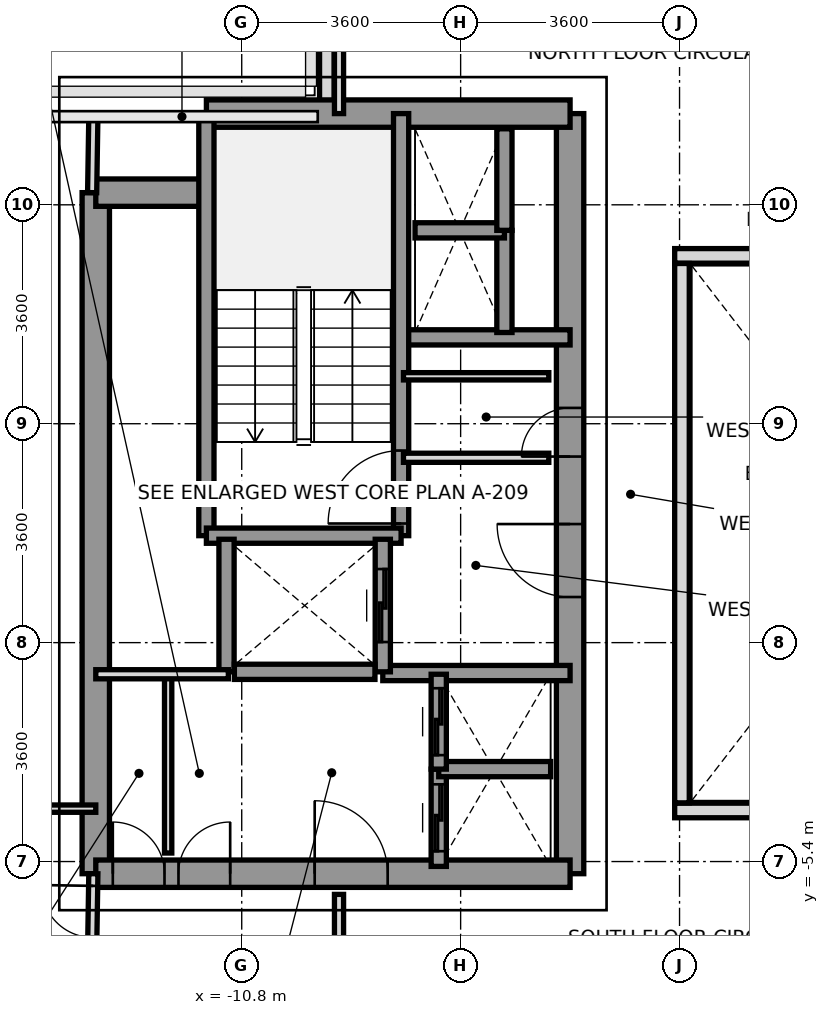
"""IFC4 building model, lengths in metres.
Left out: names, types, materials, properties, quantities, classifications, styles, units other than length and angle.
Written with IfcOpenShell. Run it as: python <this file> out.ifc"""

import sys

from ifc_helpers import new_model, si_unit, direction, frame, frame_2d, origin, place, context, subcontext, project, spatial, rectangle, extrude, source, transform, mapped, element, fill, save


model = new_model("IFC4")
c1 = context("Model", 3, precision=1e-05, world=origin(), true_north=direction((0.0, 1.0)))
c2 = subcontext(c1, "Body", "Model", "MODEL_VIEW")
j1 = project(units=[si_unit("LENGTHUNIT", "METRE"), si_unit("PLANEANGLEUNIT", "RADIAN")], contexts=[c1])
p1 = place(None, origin())
s1 = spatial("IfcSite", under=j1, at=p1, CompositionType="ELEMENT")
p2 = place(p1, origin())
s2 = spatial("IfcBuilding", under=s1, at=p2, CompositionType="ELEMENT")
p3 = place(p2, frame((0.0, 0.0, 124.4)))
s3 = spatial("IfcBuildingStorey", under=s2, at=p3, CompositionType="ELEMENT", Elevation=124.4)
p4 = place(p3, frame((-9.4, 6.953, 0.0), z_axis=(0.0, 0.0, 1.0), x_axis=(0.0, 1.0, 0.0)))
e1 = element("IfcWall", 1, at=p4, inside=s3, PredefinedType="PARAPET", context=c2, shape_type="SweptSolid", body=[
    extrude(rectangle(XDim=1.519, YDim=0.24, at=frame_2d((0.76, 0.0))), origin(), (0.0, 0.0, 1.0), 1.15),
])
p5 = place(p3, frame((-13.2, -5.6, 0.0), z_axis=(0.0, 0.0, 1.0), x_axis=(0.0, 1.0, 0.0)))
e2 = element("IfcWall", 2, at=p5, inside=s3, PredefinedType="SHEAR", context=c2, shape_type="SweptSolid", body=[
    extrude(rectangle(XDim=11.2, YDim=0.45, at=frame_2d((5.6, 0.0))), origin(), (0.0, 0.0, 1.0), 3.2),
])
p6 = place(p3, frame((-5.4, -5.6, 0.0), z_axis=(0.0, 0.0, 1.0), x_axis=(0.0, 1.0, 0.0)))
e3 = element("IfcWall", 3, at=p6, inside=s3, PredefinedType="SHEAR", context=c2, shape_type="SweptSolid", body=[
    extrude(rectangle(XDim=12.5, YDim=0.45, at=frame_2d((6.25, 0.0))), origin(), (0.0, 0.0, 1.0), 3.2),
])
p7 = place(p6, frame((4.55, 0.0, 0.0)))
e4 = element("IfcOpeningElement", 4, at=p7, cuts=e3, PredefinedType="OPENING", context=c2, shape_type="SweptSolid", body=[
    extrude(rectangle(XDim=1.2, YDim=2.2, at=frame_2d((0.6, 1.1))), frame((0.0, 0.235, 0.0), z_axis=(0.0, -1.0, 0.0), x_axis=(1.0, 0.0, 0.0)), (0.0, 0.0, 1.0), 0.47),
])
p8 = place(p6, frame((6.86, 0.0, 0.0)))
e5 = element("IfcOpeningElement", 5, at=p8, cuts=e3, PredefinedType="OPENING", context=c2, shape_type="SweptSolid", body=[
    extrude(rectangle(XDim=0.8, YDim=2.1, at=frame_2d((0.4, 1.05))), frame((0.0, 0.235, 0.0), z_axis=(0.0, -1.0, 0.0), x_axis=(1.0, 0.0, 0.0)), (0.0, 0.0, 1.0), 0.47),
])
p9 = place(p3, frame((-11.381, 6.9, 0.0), z_axis=(0.0, 0.0, 1.0), x_axis=(1.0, 0.0, 0.0)))
e6 = element("IfcWall", 6, at=p9, inside=s3, PredefinedType="SHEAR", context=c2, shape_type="SweptSolid", body=[
    extrude(rectangle(XDim=5.981, YDim=0.45, at=frame_2d((2.991, 0.0))), origin(), (0.0, 0.0, 1.0), 3.2),
])
p10 = place(p3, frame((-13.2, 5.6, 0.0), z_axis=(0.0, 0.0, 1.0), x_axis=(1.0, 0.0, 0.0)))
e7 = element("IfcWall", 7, at=p10, inside=s3, PredefinedType="SHEAR", context=c2, shape_type="SweptSolid", body=[
    extrude(rectangle(XDim=1.819, YDim=0.45, at=frame_2d((0.909, 0.0))), origin(), (0.0, 0.0, 1.0), 3.2),
])
p11 = place(p3, frame((-13.2, -5.6, 0.0), z_axis=(0.0, 0.0, 1.0), x_axis=(1.0, 0.0, 0.0)))
e8 = element("IfcWall", 8, at=p11, inside=s3, PredefinedType="SHEAR", context=c2, shape_type="SweptSolid", body=[
    extrude(rectangle(XDim=7.8, YDim=0.45, at=frame_2d((3.9, 0.0))), origin(), (0.0, 0.0, 1.0), 3.2),
])
p12 = place(p11, frame((3.6, 0.0, 0.0)))
e9 = element("IfcOpeningElement", 9, at=p12, cuts=e8, PredefinedType="OPENING", context=c2, shape_type="SweptSolid", body=[
    extrude(rectangle(XDim=1.2, YDim=2.2, at=frame_2d((0.6, 1.1))), frame((0.0, 0.235, 0.0), z_axis=(0.0, -1.0, 0.0), x_axis=(1.0, 0.0, 0.0)), (0.0, 0.0, 1.0), 0.47),
])
p13 = place(p11, frame((0.28, 0.0, 0.0)))
e10 = element("IfcOpeningElement", 10, at=p13, cuts=e8, PredefinedType="OPENING", context=c2, shape_type="SweptSolid", body=[
    extrude(rectangle(XDim=0.85, YDim=2.1, at=frame_2d((0.425, 1.05))), frame((0.0, 0.235, 0.0), z_axis=(0.0, -1.0, 0.0), x_axis=(1.0, 0.0, 0.0)), (0.0, 0.0, 1.0), 0.47),
])
p14 = place(p11, frame((1.36, 0.0, 0.0)))
e11 = element("IfcOpeningElement", 11, at=p14, cuts=e8, PredefinedType="OPENING", context=c2, shape_type="SweptSolid", body=[
    extrude(rectangle(XDim=0.85, YDim=2.1, at=frame_2d((0.425, 1.05))), frame((0.0, 0.235, 0.0), z_axis=(0.0, -1.0, 0.0), x_axis=(1.0, 0.0, 0.0)), (0.0, 0.0, 1.0), 0.47),
])
p15 = place(p3, frame((-8.18, 3.22, 0.0), z_axis=(0.0, 0.0, 1.0), x_axis=(1.0, 0.0, 0.0)))
e12 = element("IfcWall", 12, at=p15, inside=s3, PredefinedType="SOLIDWALL", context=c2, shape_type="SweptSolid", body=[
    extrude(rectangle(XDim=2.78, YDim=0.25, at=frame_2d((1.39, 0.0))), origin(), (0.0, 0.0, 1.0), 3.2),
])
p16 = place(p3, frame((-8.48, -2.3, 0.0), z_axis=(0.0, 0.0, 1.0), x_axis=(1.0, 0.0, 0.0)))
e13 = element("IfcWall", 13, at=p16, inside=s3, PredefinedType="SOLIDWALL", context=c2, shape_type="SweptSolid", body=[
    extrude(rectangle(XDim=3.08, YDim=0.25, at=frame_2d((1.54, 0.0))), origin(), (0.0, 0.0, 1.0), 3.2),
])
p17 = place(p3, frame((-8.179, -0.041, 0.0), z_axis=(0.0, 0.0, 1.0), x_axis=(0.0, 1.0, 0.0)))
e14 = element("IfcWall", 14, at=p17, inside=s3, PredefinedType="SOLIDWALL", context=c2, shape_type="SweptSolid", body=[
    extrude(rectangle(XDim=6.941, YDim=0.25, at=frame_2d((3.47, 0.0))), origin(), (0.0, 0.0, 1.0), 3.2),
])
p18 = place(p17, frame((0.2, 0.0, 0.0)))
e15 = element("IfcOpeningElement", 15, at=p18, cuts=e14, PredefinedType="OPENING", context=c2, shape_type="SweptSolid", body=[
    extrude(rectangle(XDim=1.2, YDim=2.2, at=frame_2d((0.6, 1.1))), frame((0.0, 0.135, 0.0), z_axis=(0.0, -1.0, 0.0), x_axis=(1.0, 0.0, 0.0)), (0.0, 0.0, 1.0), 0.27),
])
p19 = place(p3, frame((-11.381, -0.041, 0.0), z_axis=(0.0, 0.0, 1.0), x_axis=(0.0, 1.0, 0.0)))
e16 = element("IfcWall", 16, at=p19, inside=s3, PredefinedType="SOLIDWALL", context=c2, shape_type="SweptSolid", body=[
    extrude(rectangle(XDim=6.941, YDim=0.25, at=frame_2d((3.47, 0.0))), origin(), (0.0, 0.0, 1.0), 3.2),
])
p20 = place(p3, frame((-11.381, -0.041, 0.0), z_axis=(0.0, 0.0, 1.0), x_axis=(1.0, 0.0, 0.0)))
e17 = element("IfcWall", 17, at=p20, inside=s3, PredefinedType="SOLIDWALL", context=c2, shape_type="SweptSolid", body=[
    extrude(rectangle(XDim=3.202, YDim=0.25, at=frame_2d((1.601, 0.0))), origin(), (0.0, 0.0, 1.0), 3.2),
])
p21 = place(p3, frame((-11.05, -2.28, 0.0), z_axis=(0.0, 0.0, 1.0), x_axis=(0.0, 1.0, 0.0)))
e18 = element("IfcWall", 18, at=p21, inside=s3, PredefinedType="SOLIDWALL", context=c2, shape_type="SweptSolid", body=[
    extrude(rectangle(XDim=2.18, YDim=0.25, at=frame_2d((1.09, 0.0))), origin(), (0.0, 0.0, 1.0), 3.2),
])
p22 = place(p3, frame((-8.48, -2.28, 0.0), z_axis=(0.0, 0.0, 1.0), x_axis=(0.0, 1.0, 0.0)))
e19 = element("IfcWall", 19, at=p22, inside=s3, PredefinedType="SOLIDWALL", context=c2, shape_type="SweptSolid", body=[
    extrude(rectangle(XDim=2.18, YDim=0.25, at=frame_2d((1.09, 0.0))), origin(), (0.0, 0.0, 1.0), 3.2),
])
p23 = place(p22, frame((0.49, 0.0, 0.0)))
e20 = element("IfcOpeningElement", 20, at=p23, cuts=e19, PredefinedType="OPENING", context=c2, shape_type="SweptSolid", body=[
    extrude(rectangle(XDim=1.2, YDim=2.2, at=frame_2d((0.6, 1.1))), frame((0.0, 0.135, 0.0), z_axis=(0.0, -1.0, 0.0), x_axis=(1.0, 0.0, 0.0)), (0.0, 0.0, 1.0), 0.27),
])
p24 = place(p3, frame((-10.921, -2.28, 0.0), z_axis=(0.0, 0.0, 1.0), x_axis=(1.0, 0.0, 0.0)))
e21 = element("IfcWall", 21, at=p24, inside=s3, PredefinedType="SOLIDWALL", context=c2, shape_type="SweptSolid", body=[
    extrude(rectangle(XDim=2.312, YDim=0.25, at=frame_2d((1.156, 0.0))), origin(), (0.0, 0.0, 1.0), 3.2),
])
p25 = place(p3, frame((-7.56, -5.48, 0.0), z_axis=(0.0, 0.0, 1.0), x_axis=(0.0, 1.0, 0.0)))
e22 = element("IfcWall", 22, at=p25, inside=s3, PredefinedType="SOLIDWALL", context=c2, shape_type="SweptSolid", body=[
    extrude(rectangle(XDim=1.6, YDim=0.25, at=frame_2d((0.8, 0.0))), origin(), (0.0, 0.0, 1.0), 3.2),
])
p26 = place(p25, frame((0.25, 0.0, 0.0)))
e23 = element("IfcOpeningElement", 23, at=p26, cuts=e22, PredefinedType="OPENING", context=c2, shape_type="SweptSolid", body=[
    extrude(rectangle(XDim=1.1, YDim=2.2, at=frame_2d((0.55, 1.1))), frame((0.0, 0.135, 0.0), z_axis=(0.0, -1.0, 0.0), x_axis=(1.0, 0.0, 0.0)), (0.0, 0.0, 1.0), 0.27),
])
p27 = place(p3, frame((-7.56, -3.88, 0.0), z_axis=(0.0, 0.0, 1.0), x_axis=(1.0, 0.0, 0.0)))
e24 = element("IfcWall", 24, at=p27, inside=s3, PredefinedType="SOLIDWALL", context=c2, shape_type="SweptSolid", body=[
    extrude(rectangle(XDim=1.84, YDim=0.25, at=frame_2d((0.92, 0.0))), origin(), (0.0, 0.0, 1.0), 3.2),
])
p28 = place(p3, frame((-7.56, -3.88, 0.0), z_axis=(0.0, 0.0, 1.0), x_axis=(0.0, 1.0, 0.0)))
e25 = element("IfcWall", 25, at=p28, inside=s3, PredefinedType="SOLIDWALL", context=c2, shape_type="SweptSolid", body=[
    extrude(rectangle(XDim=1.56, YDim=0.25, at=frame_2d((0.78, 0.0))), origin(), (0.0, 0.0, 1.0), 3.2),
])
p29 = place(p28, frame((0.23, 0.0, 0.0)))
e26 = element("IfcOpeningElement", 26, at=p29, cuts=e25, PredefinedType="OPENING", context=c2, shape_type="SweptSolid", body=[
    extrude(rectangle(XDim=1.1, YDim=2.2, at=frame_2d((0.55, 1.1))), frame((0.0, 0.135, 0.0), z_axis=(0.0, -1.0, 0.0), x_axis=(1.0, 0.0, 0.0)), (0.0, 0.0, 1.0), 0.27),
])
p30 = place(p3, frame((-6.48, 3.3, 0.0), z_axis=(0.0, 0.0, 1.0), x_axis=(0.0, 1.0, 0.0)))
e27 = element("IfcWall", 27, at=p30, inside=s3, PredefinedType="SOLIDWALL", context=c2, shape_type="SweptSolid", body=[
    extrude(rectangle(XDim=1.68, YDim=0.25, at=frame_2d((0.84, 0.0))), origin(), (0.0, 0.0, 1.0), 3.2),
])
p31 = place(p3, frame((-7.95, 4.98, 0.0), z_axis=(0.0, 0.0, 1.0), x_axis=(1.0, 0.0, 0.0)))
e28 = element("IfcWall", 28, at=p31, inside=s3, PredefinedType="SOLIDWALL", context=c2, shape_type="SweptSolid", body=[
    extrude(rectangle(XDim=1.47, YDim=0.25, at=frame_2d((0.735, 0.0))), origin(), (0.0, 0.0, 1.0), 3.2),
])
p32 = place(p3, frame((-6.48, 4.98, 0.0), z_axis=(0.0, 0.0, 1.0), x_axis=(0.0, 1.0, 0.0)))
e29 = element("IfcWall", 29, at=p32, inside=s3, PredefinedType="SOLIDWALL", context=c2, shape_type="SweptSolid", body=[
    extrude(rectangle(XDim=1.67, YDim=0.25, at=frame_2d((0.835, 0.0))), origin(), (0.0, 0.0, 1.0), 3.2),
])
p33 = place(p3, frame((-8.14, 1.24, 0.0), z_axis=(0.0, 0.0, 1.0), x_axis=(1.0, 0.0, 0.0)))
e30 = element("IfcWall", 30, at=p33, inside=s3, PredefinedType="PARTITIONING", context=c2, shape_type="SweptSolid", body=[
    extrude(rectangle(XDim=2.39, YDim=0.15, at=frame_2d((1.195, 0.0))), origin(), (0.0, 0.0, 1.0), 2.3),
])
p34 = place(p3, frame((-8.14, 2.58, 0.0), z_axis=(0.0, 0.0, 1.0), x_axis=(1.0, 0.0, 0.0)))
e31 = element("IfcWall", 31, at=p34, inside=s3, PredefinedType="PARTITIONING", context=c2, shape_type="SweptSolid", body=[
    extrude(rectangle(XDim=2.39, YDim=0.12, at=frame_2d((1.195, 0.0))), origin(), (0.0, 0.0, 1.0), 2.3),
])
p35 = place(p3, frame((-12.01, -5.26, 0.0), z_axis=(0.0, 0.0, 1.0), x_axis=(0.0, 1.0, 0.0)))
e32 = element("IfcWall", 32, at=p35, inside=s3, PredefinedType="PARTITIONING", context=c2, shape_type="SweptSolid", body=[
    extrude(rectangle(XDim=2.94, YDim=0.12, at=frame_2d((1.47, 0.0))), origin(), (0.0, 0.0, 1.0), 3.2),
])
p36 = place(p3, frame((-13.2, -2.32, 0.0), z_axis=(0.0, 0.0, 1.0), x_axis=(1.0, 0.0, 0.0)))
e33 = element("IfcWall", 33, at=p36, inside=s3, PredefinedType="PARTITIONING", context=c2, shape_type="SweptSolid", body=[
    extrude(rectangle(XDim=2.18, YDim=0.15, at=frame_2d((1.09, 0.0))), origin(), (0.0, 0.0, 1.0), 3.2),
])
p37 = place(p3, frame((-9.2, 6.9, 0.0), z_axis=(0.0, 0.0, 1.0), x_axis=(0.0, 1.0, 0.0)))
e34 = element("IfcWall", 34, at=p37, inside=s3, PredefinedType="PARTITIONING", context=c2, shape_type="SweptSolid", body=[
    extrude(rectangle(XDim=8.78, YDim=0.15, at=frame_2d((4.39, 0.0))), origin(), (0.0, 0.0, 1.0), 2.7),
])
p38 = place(p3, frame((-9.2, -15.68, 0.0), z_axis=(0.0, 0.0, 1.0), x_axis=(0.0, 1.0, 0.0)))
e35 = element("IfcWall", 35, at=p38, inside=s3, PredefinedType="PARTITIONING", context=c2, shape_type="SweptSolid", body=[
    extrude(rectangle(XDim=9.74, YDim=0.15, at=frame_2d((4.87, 0.0))), origin(), (0.0, 0.0, 1.0), 2.7),
])
p39 = place(p3, frame((-13.26, 5.6, 0.0), z_axis=(0.0, 0.0, 1.0), x_axis=(0.016013571389, 0.999871774545, 0.0)))
e36 = element("IfcWall", 36, at=p39, inside=s3, PredefinedType="PARTITIONING", context=c2, shape_type="SweptSolid", body=[
    extrude(rectangle(XDim=1.25, YDim=0.15, at=frame_2d((0.625, 0.0))), origin(), (0.0, 0.0, 1.0), 3.2),
])
p40 = place(p3, frame((-13.26, -6.85, 0.0), z_axis=(0.0, 0.0, 1.0), x_axis=(0.016013571389, 0.999871774545, 0.0)))
e37 = element("IfcWall", 37, at=p40, inside=s3, PredefinedType="PARTITIONING", context=c2, shape_type="SweptSolid", body=[
    extrude(rectangle(XDim=1.25, YDim=0.15, at=frame_2d((0.625, 0.0))), origin(), (0.0, 0.0, 1.0), 3.2),
])
p41 = place(p40, frame((0.2, 0.0, 0.0)))
e38 = element("IfcOpeningElement", 38, at=p41, cuts=e37, PredefinedType="OPENING", context=c2, shape_type="SweptSolid", body=[
    extrude(rectangle(XDim=0.85, YDim=2.1, at=frame_2d((0.425, 1.05))), frame((0.0, 0.085, 0.0), z_axis=(0.0, -1.0, 0.0), x_axis=(1.0, 0.0, 0.0)), (0.0, 0.0, 1.0), 0.17),
])
p42 = place(p3, frame((-23.3, -4.53, 0.0), z_axis=(0.0, 0.0, 1.0), x_axis=(1.0, 0.0, 0.0)))
e39 = element("IfcWall", 39, at=p42, inside=s3, PredefinedType="PARTITIONING", context=c2, shape_type="SweptSolid", body=[
    extrude(rectangle(XDim=10.1, YDim=0.12, at=frame_2d((5.05, 0.0))), origin(), (0.0, 0.0, 1.0), 2.76),
])
p43 = place(p42, frame((1.4, 0.0, 0.0)))
e40 = element("IfcOpeningElement", 40, at=p43, cuts=e39, PredefinedType="OPENING", context=c2, shape_type="SweptSolid", body=[
    extrude(rectangle(XDim=0.95, YDim=2.15, at=frame_2d((0.475, 1.075))), frame((0.0, 0.07, 0.0), z_axis=(0.0, -1.0, 0.0), x_axis=(1.0, 0.0, 0.0)), (0.0, 0.0, 1.0), 0.14),
])
for number, where, z_axis, x_axis in (
    (41, (-3.68, -4.56, 0.0), (0.0, 0.0, 1.0), (1.0, 0.0, 0.0)),
    (42, (-3.68, 4.56, 0.0), (0.0, 0.0, 1.0), (1.0, 0.0, 0.0)),
):
    element("IfcWall", number, at=place(p3, frame(where, z_axis=z_axis, x_axis=x_axis)), inside=s3, PredefinedType="PARAPET", context=c2, shape_type="SweptSolid", body=[
        extrude(rectangle(XDim=7.36, YDim=0.24, at=frame_2d((3.68, 0.0))), origin(), (0.0, 0.0, 1.0), 1.15),
    ])
p44 = place(p3, frame((-3.56, -4.435, 0.0), z_axis=(0.0, 0.0, 1.0), x_axis=(0.0, 1.0, 0.0)))
e43 = element("IfcWall", 43, at=p44, inside=s3, PredefinedType="PARAPET", context=c2, shape_type="SweptSolid", body=[
    extrude(rectangle(XDim=8.87, YDim=0.24, at=frame_2d((4.435, 0.0))), origin(), (0.0, 0.0, 1.0), 1.15),
])
m1 = source(origin(), c2, "Body", "SweptSolid", [
    extrude(rectangle(XDim=1.2, YDim=2.2, at=frame_2d((0.6, 1.1))), frame((0.0, 0.025, 0.0), z_axis=(0.0, -1.0, 0.0), x_axis=(1.0, 0.0, 0.0)), (0.0, 0.0, 1.0), 0.05),
])
p45 = place(p18, origin())
e44 = element("IfcDoor", 44, at=p45, inside=s3, OperationType="SINGLE_SWING_LEFT", PredefinedType="DOOR", context=c2, shape_type="MappedRepresentation", body=[
    mapped(m1, transform((0.0, 0.0, 0.0), x_axis=(1.0, 0.0, 0.0), y_axis=(0.0, 1.0, 0.0), z_axis=(0.0, 0.0, 1.0), scale=1.0)),
])
fill(e15, e44)
p46 = place(p7, origin())
e45 = element("IfcDoor", 45, at=p46, inside=s3, OperationType="SINGLE_SWING_RIGHT", PredefinedType="DOOR", context=c2, shape_type="MappedRepresentation", body=[
    mapped(m1, transform((0.0, 0.0, 0.0), x_axis=(1.0, 0.0, 0.0), y_axis=(0.0, 1.0, 0.0), z_axis=(0.0, 0.0, 1.0), scale=1.0)),
])
fill(e4, e45)
p47 = place(p12, origin())
e46 = element("IfcDoor", 46, at=p47, inside=s3, OperationType="SINGLE_SWING_LEFT", PredefinedType="DOOR", context=c2, shape_type="MappedRepresentation", body=[
    mapped(m1, transform((0.0, 0.0, 0.0), x_axis=(1.0, 0.0, 0.0), y_axis=(0.0, 1.0, 0.0), z_axis=(0.0, 0.0, 1.0), scale=1.0)),
])
fill(e9, e46)
m2 = source(origin(), c2, "Body", "SweptSolid", [
    extrude(rectangle(XDim=0.8, YDim=2.1, at=frame_2d((0.4, 1.05))), frame((0.0, 0.025, 0.0), z_axis=(0.0, -1.0, 0.0), x_axis=(1.0, 0.0, 0.0)), (0.0, 0.0, 1.0), 0.05),
])
p48 = place(p8, origin())
e47 = element("IfcDoor", 47, at=p48, inside=s3, OperationType="SINGLE_SWING_LEFT", PredefinedType="DOOR", context=c2, shape_type="MappedRepresentation", body=[
    mapped(m2, transform((0.0, 0.0, 0.0), x_axis=(1.0, 0.0, 0.0), y_axis=(0.0, 1.0, 0.0), z_axis=(0.0, 0.0, 1.0), scale=1.0)),
])
fill(e5, e47)
m3 = source(origin(), c2, "Body", "SweptSolid", [
    extrude(rectangle(XDim=0.85, YDim=2.1, at=frame_2d((0.425, 1.05))), frame((0.0, 0.025, 0.0), z_axis=(0.0, -1.0, 0.0), x_axis=(1.0, 0.0, 0.0)), (0.0, 0.0, 1.0), 0.05),
])
p49 = place(p13, origin())
e48 = element("IfcDoor", 48, at=p49, inside=s3, OperationType="SINGLE_SWING_LEFT", PredefinedType="DOOR", context=c2, shape_type="MappedRepresentation", body=[
    mapped(m3, transform((0.0, 0.0, 0.0), x_axis=(1.0, 0.0, 0.0), y_axis=(0.0, 1.0, 0.0), z_axis=(0.0, 0.0, 1.0), scale=1.0)),
])
fill(e10, e48)
p50 = place(p14, origin())
e49 = element("IfcDoor", 49, at=p50, inside=s3, OperationType="SINGLE_SWING_RIGHT", PredefinedType="DOOR", context=c2, shape_type="MappedRepresentation", body=[
    mapped(m3, transform((0.0, 0.0, 0.0), x_axis=(1.0, 0.0, 0.0), y_axis=(0.0, 1.0, 0.0), z_axis=(0.0, 0.0, 1.0), scale=1.0)),
])
fill(e11, e49)
p51 = place(p23, origin())
e50 = element("IfcDoor", 50, at=p51, inside=s3, OperationType="SLIDING_TO_RIGHT", PredefinedType="DOOR", context=c2, shape_type="MappedRepresentation", body=[
    mapped(m1, transform((0.0, 0.0, 0.0), x_axis=(1.0, 0.0, 0.0), y_axis=(0.0, 1.0, 0.0), z_axis=(0.0, 0.0, 1.0), scale=1.0)),
])
fill(e20, e50)
m4 = source(origin(), c2, "Body", "SweptSolid", [
    extrude(rectangle(XDim=1.1, YDim=2.2, at=frame_2d((0.55, 1.1))), frame((0.0, 0.025, 0.0), z_axis=(0.0, -1.0, 0.0), x_axis=(1.0, 0.0, 0.0)), (0.0, 0.0, 1.0), 0.05),
])
p52 = place(p26, origin())
e51 = element("IfcDoor", 51, at=p52, inside=s3, OperationType="SLIDING_TO_LEFT", PredefinedType="DOOR", context=c2, shape_type="MappedRepresentation", body=[
    mapped(m4, transform((0.0, 0.0, 0.0), x_axis=(1.0, 0.0, 0.0), y_axis=(0.0, 1.0, 0.0), z_axis=(0.0, 0.0, 1.0), scale=1.0)),
])
fill(e23, e51)
p53 = place(p29, origin())
e52 = element("IfcDoor", 52, at=p53, inside=s3, OperationType="SLIDING_TO_LEFT", PredefinedType="DOOR", context=c2, shape_type="MappedRepresentation", body=[
    mapped(m4, transform((0.0, 0.0, 0.0), x_axis=(1.0, 0.0, 0.0), y_axis=(0.0, 1.0, 0.0), z_axis=(0.0, 0.0, 1.0), scale=1.0)),
])
fill(e26, e52)
p54 = place(p41, origin())
e53 = element("IfcDoor", 53, at=p54, inside=s3, OperationType="SINGLE_SWING_RIGHT", PredefinedType="DOOR", context=c2, shape_type="MappedRepresentation", body=[
    mapped(m3, transform((0.0, 0.0, 0.0), x_axis=(1.0, 0.0, 0.0), y_axis=(0.0, 1.0, 0.0), z_axis=(0.0, 0.0, 1.0), scale=1.0)),
])
fill(e38, e53)
save(model, sys.argv[1])
